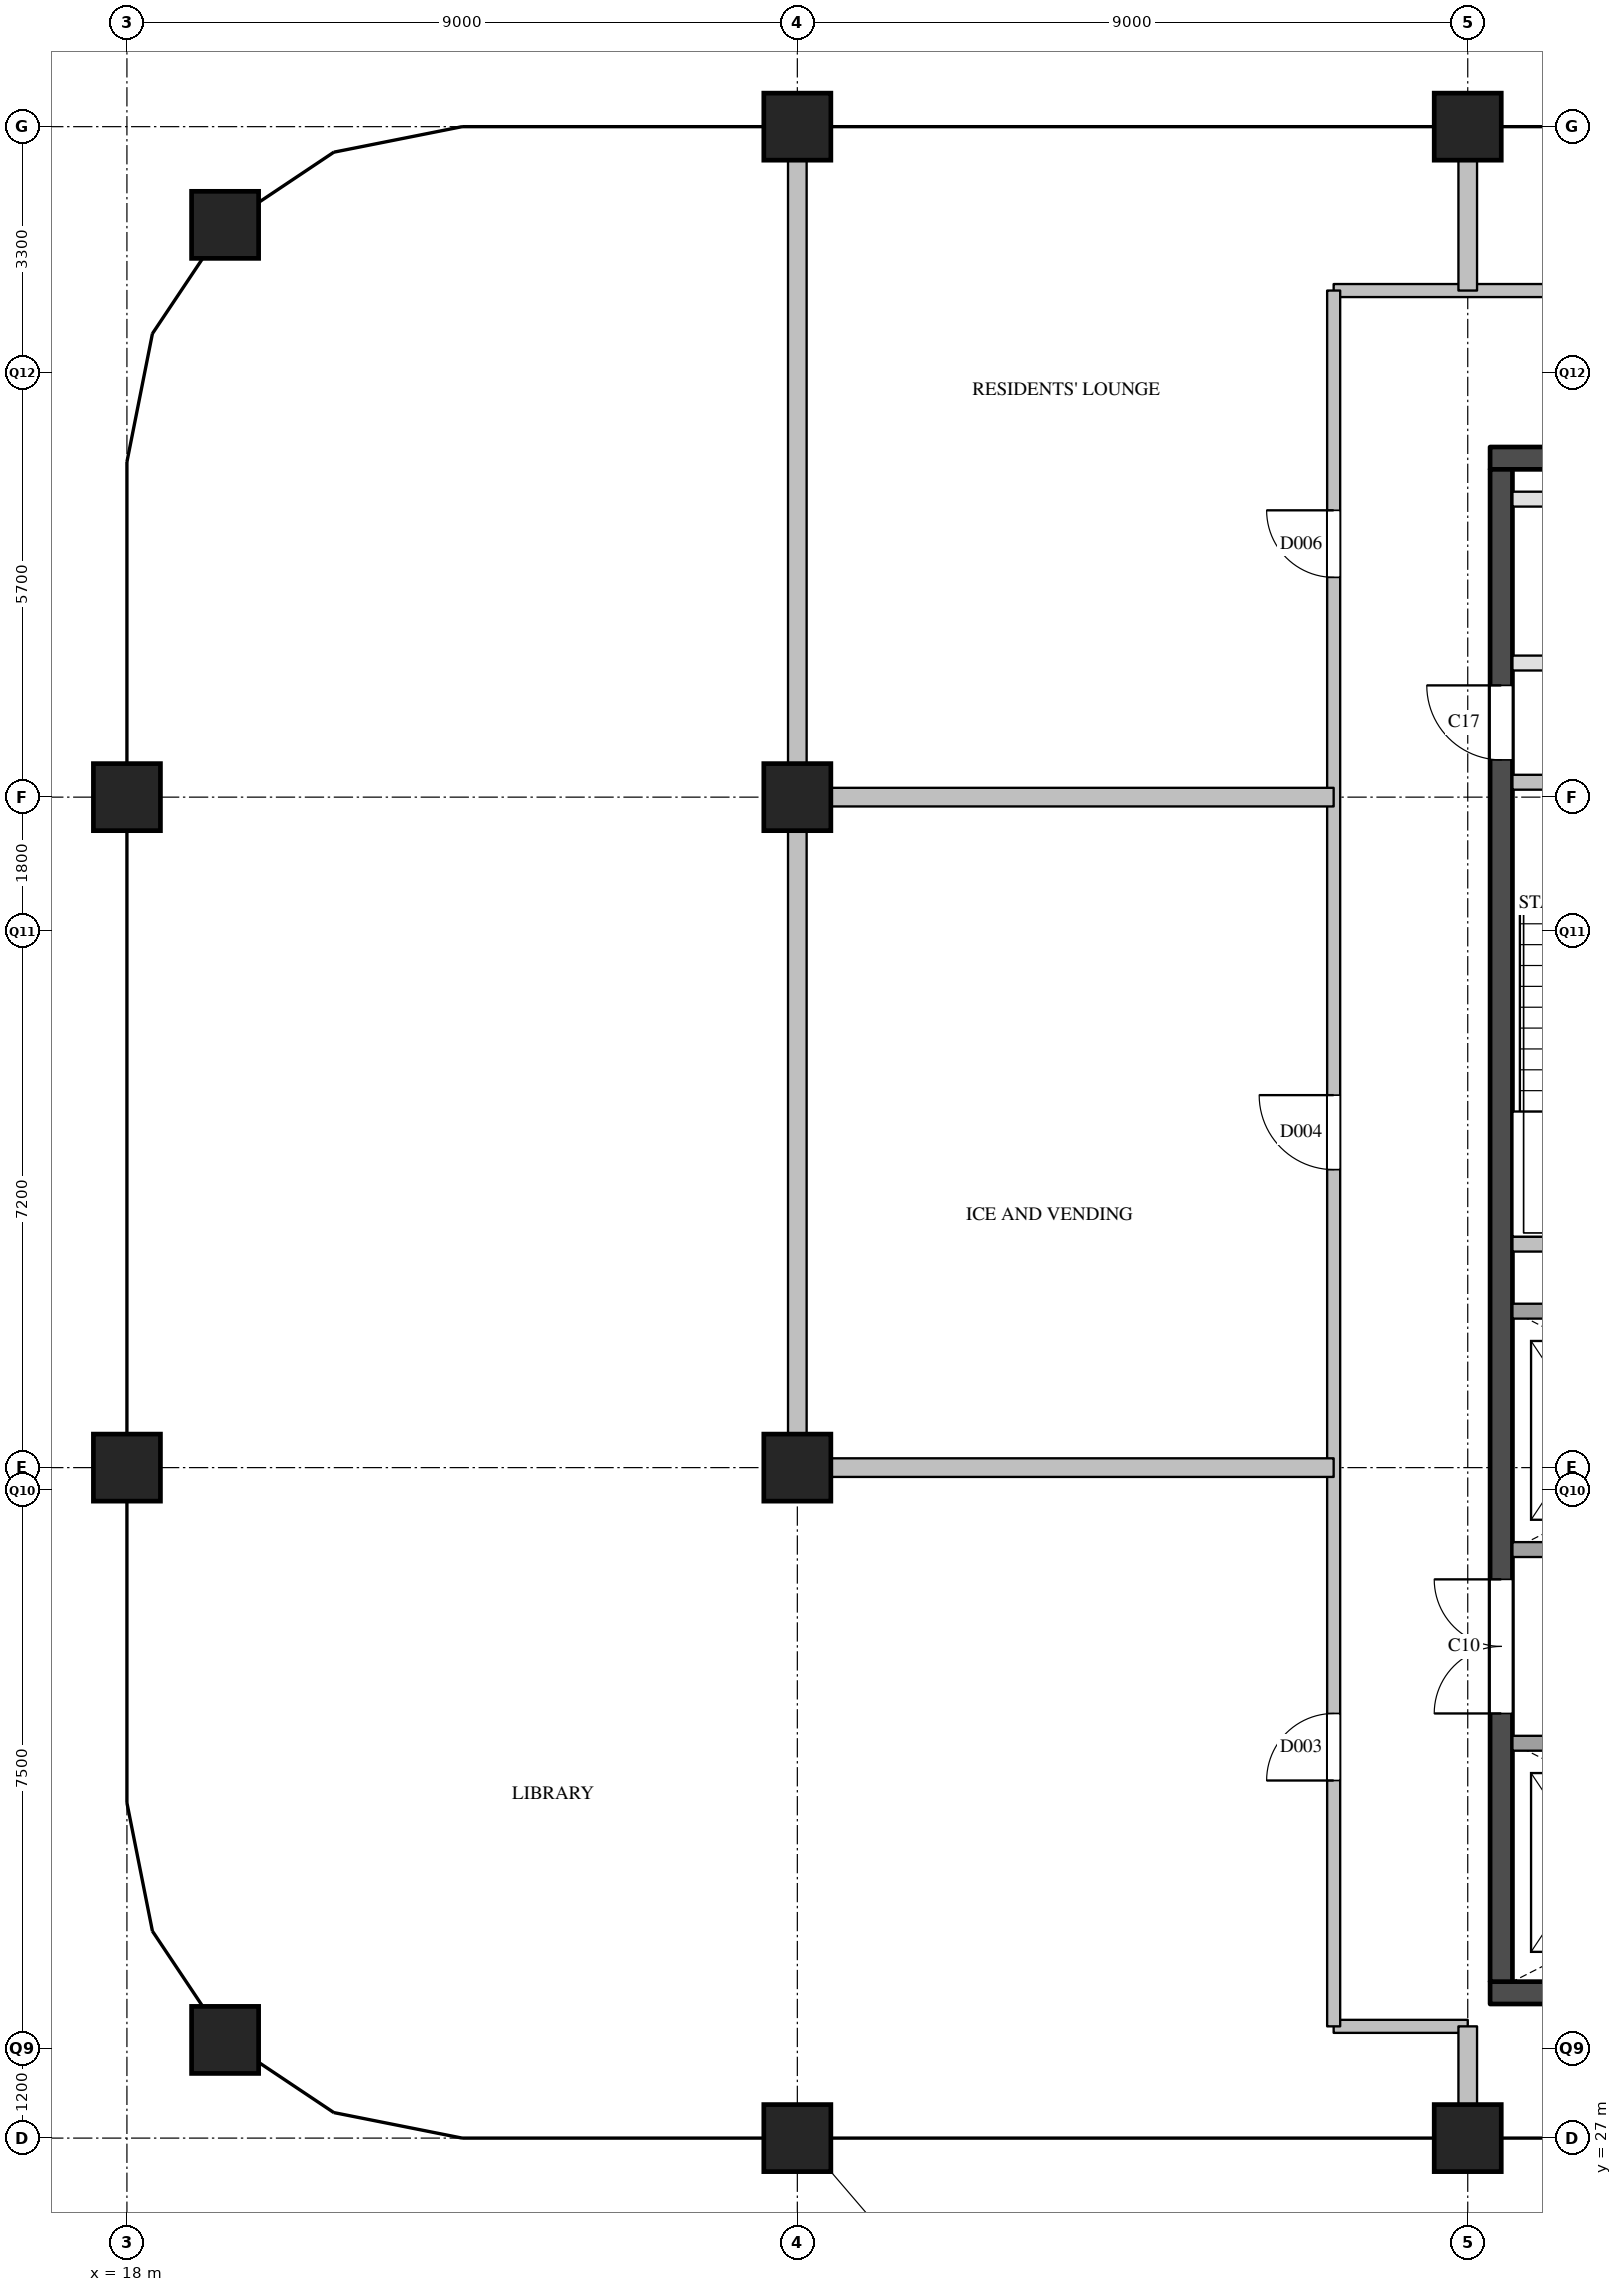
"""IFC4 building model, lengths in metres.
Left out: names, types, materials, properties, quantities, classifications, styles, units other than length and angle.
Written with IfcOpenShell. Run it as: python <this file> out.ifc"""

import sys

from ifc_helpers import new_model, si_unit, direction, frame, frame_2d, origin, origin_2d, place, context, subcontext, project, spatial, rectangle, extrude, element, fill, save


model = new_model("IFC4")
c1 = context("Model", 3, precision=1e-05, world=origin(), true_north=direction((0.0, 1.0)))
c2 = subcontext(c1, "Body", "Model", "MODEL_VIEW")
j1 = project(units=[si_unit("LENGTHUNIT", "METRE"), si_unit("PLANEANGLEUNIT", "RADIAN")], contexts=[c1])
p1 = place(None, origin())
s1 = spatial("IfcSite", under=j1, at=p1, CompositionType="ELEMENT")
p2 = place(p1, origin())
s2 = spatial("IfcBuilding", under=s1, at=p2, CompositionType="ELEMENT")
p3 = place(p2, frame((0.0, 0.0, 316.8)))
s3 = spatial("IfcBuildingStorey", under=s2, at=p3, CompositionType="ELEMENT", Elevation=316.8)
for number, where, z_axis, x_axis in (
    (1, (19.318, 28.318, 0.0), (0.0, 0.0, 1.0), (1.0, 0.0, 0.0)),
    (2, (18.0, 36.0, 0.0), (0.0, 0.0, 1.0), (1.0, 0.0, 0.0)),
    (3, (18.0, 45.0, 0.0), (0.0, 0.0, 1.0), (1.0, 0.0, 0.0)),
    (4, (19.318, 52.682, 0.0), (0.0, 0.0, 1.0), (1.0, 0.0, 0.0)),
    (5, (27.0, 27.0, 0.0), (0.0, 0.0, 1.0), (1.0, 0.0, 0.0)),
    (6, (27.0, 36.0, 0.0), (0.0, 0.0, 1.0), (1.0, 0.0, 0.0)),
    (7, (27.0, 45.0, 0.0), (0.0, 0.0, 1.0), (1.0, 0.0, 0.0)),
    (8, (27.0, 54.0, 0.0), (0.0, 0.0, 1.0), (1.0, 0.0, 0.0)),
    (9, (36.0, 27.0, 0.0), (0.0, 0.0, 1.0), (1.0, 0.0, 0.0)),
    (10, (36.0, 54.0, 0.0), (0.0, 0.0, 1.0), (1.0, 0.0, 0.0)),
):
    element("IfcColumn", number, at=place(p3, frame(where, z_axis=z_axis, x_axis=x_axis)), inside=s3, PredefinedType="COLUMN", context=c2, shape_type="SweptSolid", body=[
        extrude(rectangle(XDim=0.9, YDim=0.9, at=origin_2d()), origin(), (0.0, 0.0, 1.0), 3.9),
    ])
p4 = place(p3, frame((36.3, 28.95, 0.0), z_axis=(0.0, 0.0, 1.0), x_axis=(1.0, 0.0, 0.0)))
e11 = element("IfcWall", 11, at=p4, inside=s3, PredefinedType="SHEAR", context=c2, shape_type="SweptSolid", body=[
    extrude(rectangle(XDim=11.8, YDim=0.3, at=frame_2d((5.9, 0.0))), origin(), (0.0, 0.0, 1.0), 3.6),
])
p5 = place(p4, frame((0.75, 0.0, 0.0)))
e12 = element("IfcOpeningElement", 12, at=p5, cuts=e11, PredefinedType="OPENING", context=c2, shape_type="SweptSolid", body=[
    extrude(rectangle(XDim=1.2, YDim=2.1, at=frame_2d((0.6, 1.05))), frame((0.0, 0.16, 0.0), z_axis=(0.0, -1.0, 0.0), x_axis=(1.0, 0.0, 0.0)), (0.0, 0.0, 1.0), 0.32),
])
p6 = place(p4, frame((2.85, 0.0, 0.0)))
e13 = element("IfcOpeningElement", 13, at=p6, cuts=e11, PredefinedType="OPENING", context=c2, shape_type="SweptSolid", body=[
    extrude(rectangle(XDim=1.2, YDim=2.1, at=frame_2d((0.6, 1.05))), frame((0.0, 0.16, 0.0), z_axis=(0.0, -1.0, 0.0), x_axis=(1.0, 0.0, 0.0)), (0.0, 0.0, 1.0), 0.32),
])
p7 = place(p4, frame((4.95, 0.0, 0.0)))
e14 = element("IfcOpeningElement", 14, at=p7, cuts=e11, PredefinedType="OPENING", context=c2, shape_type="SweptSolid", body=[
    extrude(rectangle(XDim=1.2, YDim=2.1, at=frame_2d((0.6, 1.05))), frame((0.0, 0.16, 0.0), z_axis=(0.0, -1.0, 0.0), x_axis=(1.0, 0.0, 0.0)), (0.0, 0.0, 1.0), 0.32),
])
p8 = place(p3, frame((36.3, 49.55, 0.0), z_axis=(0.0, 0.0, 1.0), x_axis=(1.0, 0.0, 0.0)))
e15 = element("IfcWall", 15, at=p8, inside=s3, PredefinedType="SHEAR", context=c2, shape_type="SweptSolid", body=[
    extrude(rectangle(XDim=11.8, YDim=0.3, at=frame_2d((5.9, 0.0))), origin(), (0.0, 0.0, 1.0), 3.6),
])
p9 = place(p3, frame((36.45, 29.1, 0.0), z_axis=(0.0, 0.0, 1.0), x_axis=(0.0, 1.0, 0.0)))
e16 = element("IfcWall", 16, at=p9, inside=s3, PredefinedType="SHEAR", context=c2, shape_type="SweptSolid", body=[
    extrude(rectangle(XDim=20.3, YDim=0.3, at=frame_2d((10.15, 0.0))), origin(), (0.0, 0.0, 1.0), 3.6),
])
p10 = place(p9, frame((3.6, 0.0, 0.0)))
e17 = element("IfcOpeningElement", 17, at=p10, cuts=e16, PredefinedType="OPENING", context=c2, shape_type="SweptSolid", body=[
    extrude(rectangle(XDim=1.8, YDim=2.1, at=frame_2d((0.9, 1.05))), frame((0.0, 0.16, 0.0), z_axis=(0.0, -1.0, 0.0), x_axis=(1.0, 0.0, 0.0)), (0.0, 0.0, 1.0), 0.32),
])
p11 = place(p9, frame((16.4, 0.0, 0.0)))
e18 = element("IfcOpeningElement", 18, at=p11, cuts=e16, PredefinedType="OPENING", context=c2, shape_type="SweptSolid", body=[
    extrude(rectangle(XDim=1.0, YDim=2.1, at=frame_2d((0.5, 1.05))), frame((0.0, 0.16, 0.0), z_axis=(0.0, -1.0, 0.0), x_axis=(1.0, 0.0, 0.0)), (0.0, 0.0, 1.0), 0.32),
])
p12 = place(p3, frame((36.6, 32.3, 0.0), z_axis=(0.0, 0.0, 1.0), x_axis=(1.0, 0.0, 0.0)))
e19 = element("IfcWall", 19, at=p12, inside=s3, PredefinedType="SOLIDWALL", context=c2, shape_type="SweptSolid", body=[
    extrude(rectangle(XDim=11.2, YDim=0.2, at=frame_2d((5.6, 0.0))), origin(), (0.0, 0.0, 1.0), 3.6),
])
p13 = place(p12, frame((7.225, 0.0, 0.0)))
e20 = element("IfcOpeningElement", 20, at=p13, cuts=e19, PredefinedType="OPENING", context=c2, shape_type="SweptSolid", body=[
    extrude(rectangle(XDim=1.2, YDim=2.1, at=frame_2d((0.6, 1.05))), frame((0.0, 0.11, 0.0), z_axis=(0.0, -1.0, 0.0), x_axis=(1.0, 0.0, 0.0)), (0.0, 0.0, 1.0), 0.22),
])
p14 = place(p12, frame((9.475, 0.0, 0.0)))
e21 = element("IfcOpeningElement", 21, at=p14, cuts=e19, PredefinedType="OPENING", context=c2, shape_type="SweptSolid", body=[
    extrude(rectangle(XDim=1.2, YDim=2.1, at=frame_2d((0.6, 1.05))), frame((0.0, 0.11, 0.0), z_axis=(0.0, -1.0, 0.0), x_axis=(1.0, 0.0, 0.0)), (0.0, 0.0, 1.0), 0.22),
])
p15 = place(p3, frame((36.6, 34.9, 0.0), z_axis=(0.0, 0.0, 1.0), x_axis=(1.0, 0.0, 0.0)))
e22 = element("IfcWall", 22, at=p15, inside=s3, PredefinedType="SOLIDWALL", context=c2, shape_type="SweptSolid", body=[
    extrude(rectangle(XDim=6.3, YDim=0.2, at=frame_2d((3.15, 0.0))), origin(), (0.0, 0.0, 1.0), 3.6),
])
p16 = place(p3, frame((36.6, 38.1, 0.0), z_axis=(0.0, 0.0, 1.0), x_axis=(1.0, 0.0, 0.0)))
e23 = element("IfcWall", 23, at=p16, inside=s3, PredefinedType="SOLIDWALL", context=c2, shape_type="SweptSolid", body=[
    extrude(rectangle(XDim=6.7, YDim=0.2, at=frame_2d((3.35, 0.0))), origin(), (0.0, 0.0, 1.0), 3.6),
])
p17 = place(p16, frame((0.45, 0.0, 0.0)))
e24 = element("IfcOpeningElement", 24, at=p17, cuts=e23, PredefinedType="OPENING", context=c2, shape_type="SweptSolid", body=[
    extrude(rectangle(XDim=1.2, YDim=2.1, at=frame_2d((0.6, 1.05))), frame((0.0, 0.11, 0.0), z_axis=(0.0, -1.0, 0.0), x_axis=(1.0, 0.0, 0.0)), (0.0, 0.0, 1.0), 0.22),
])
p18 = place(p16, frame((2.55, 0.0, 0.0)))
e25 = element("IfcOpeningElement", 25, at=p18, cuts=e23, PredefinedType="OPENING", context=c2, shape_type="SweptSolid", body=[
    extrude(rectangle(XDim=1.2, YDim=2.1, at=frame_2d((0.6, 1.05))), frame((0.0, 0.11, 0.0), z_axis=(0.0, -1.0, 0.0), x_axis=(1.0, 0.0, 0.0)), (0.0, 0.0, 1.0), 0.22),
])
p19 = place(p16, frame((4.65, 0.0, 0.0)))
e26 = element("IfcOpeningElement", 26, at=p19, cuts=e23, PredefinedType="OPENING", context=c2, shape_type="SweptSolid", body=[
    extrude(rectangle(XDim=1.2, YDim=2.1, at=frame_2d((0.6, 1.05))), frame((0.0, 0.11, 0.0), z_axis=(0.0, -1.0, 0.0), x_axis=(1.0, 0.0, 0.0)), (0.0, 0.0, 1.0), 0.22),
])
p20 = place(p3, frame((36.6, 39.0, 0.0), z_axis=(0.0, 0.0, 1.0), x_axis=(1.0, 0.0, 0.0)))
e27 = element("IfcWall", 27, at=p20, inside=s3, PredefinedType="SOLIDWALL", context=c2, shape_type="SweptSolid", body=[
    extrude(rectangle(XDim=3.25, YDim=0.2, at=frame_2d((1.625, 0.0))), origin(), (0.0, 0.0, 1.0), 3.6),
])
p21 = place(p3, frame((36.6, 45.2, 0.0), z_axis=(0.0, 0.0, 1.0), x_axis=(1.0, 0.0, 0.0)))
e28 = element("IfcWall", 28, at=p21, inside=s3, PredefinedType="SOLIDWALL", context=c2, shape_type="SweptSolid", body=[
    extrude(rectangle(XDim=10.05, YDim=0.2, at=frame_2d((5.025, 0.0))), origin(), (0.0, 0.0, 1.0), 3.6),
])
p22 = place(p21, frame((1.125, 0.0, 0.0)))
e29 = element("IfcOpeningElement", 29, at=p22, cuts=e28, PredefinedType="OPENING", context=c2, shape_type="SweptSolid", body=[
    extrude(rectangle(XDim=1.1, YDim=2.1, at=frame_2d((0.55, 1.05))), frame((0.0, 0.11, 0.0), z_axis=(0.0, -1.0, 0.0), x_axis=(1.0, 0.0, 0.0)), (0.0, 0.0, 1.0), 0.22),
])
p23 = place(p21, frame((4.475, 0.0, 0.0)))
e30 = element("IfcOpeningElement", 30, at=p23, cuts=e28, PredefinedType="OPENING", context=c2, shape_type="SweptSolid", body=[
    extrude(rectangle(XDim=1.1, YDim=2.1, at=frame_2d((0.55, 1.05))), frame((0.0, 0.11, 0.0), z_axis=(0.0, -1.0, 0.0), x_axis=(1.0, 0.0, 0.0)), (0.0, 0.0, 1.0), 0.22),
])
p24 = place(p21, frame((7.825, 0.0, 0.0)))
e31 = element("IfcOpeningElement", 31, at=p24, cuts=e28, PredefinedType="OPENING", context=c2, shape_type="SweptSolid", body=[
    extrude(rectangle(XDim=1.1, YDim=2.1, at=frame_2d((0.55, 1.05))), frame((0.0, 0.11, 0.0), z_axis=(0.0, -1.0, 0.0), x_axis=(1.0, 0.0, 0.0)), (0.0, 0.0, 1.0), 0.22),
])
p25 = place(p3, frame((36.6, 46.8, 0.0), z_axis=(0.0, 0.0, 1.0), x_axis=(1.0, 0.0, 0.0)))
e32 = element("IfcWall", 32, at=p25, inside=s3, PredefinedType="PARTITIONING", context=c2, shape_type="SweptSolid", body=[
    extrude(rectangle(XDim=11.2, YDim=0.2, at=frame_2d((5.6, 0.0))), origin(), (0.0, 0.0, 1.0), 3.6),
])
p26 = place(p25, frame((3.75, 0.0, 0.0)))
e33 = element("IfcOpeningElement", 33, at=p26, cuts=e32, PredefinedType="OPENING", context=c2, shape_type="SweptSolid", body=[
    extrude(rectangle(XDim=0.9, YDim=2.1, at=frame_2d((0.45, 1.05))), frame((0.0, 0.11, 0.0), z_axis=(0.0, -1.0, 0.0), x_axis=(1.0, 0.0, 0.0)), (0.0, 0.0, 1.0), 0.22),
])
p27 = place(p25, frame((9.35, 0.0, 0.0)))
e34 = element("IfcOpeningElement", 34, at=p27, cuts=e32, PredefinedType="OPENING", context=c2, shape_type="SweptSolid", body=[
    extrude(rectangle(XDim=0.9, YDim=2.1, at=frame_2d((0.45, 1.05))), frame((0.0, 0.11, 0.0), z_axis=(0.0, -1.0, 0.0), x_axis=(1.0, 0.0, 0.0)), (0.0, 0.0, 1.0), 0.22),
])
p28 = place(p3, frame((36.6, 49.0, 0.0), z_axis=(0.0, 0.0, 1.0), x_axis=(1.0, 0.0, 0.0)))
e35 = element("IfcWall", 35, at=p28, inside=s3, PredefinedType="PARTITIONING", context=c2, shape_type="SweptSolid", body=[
    extrude(rectangle(XDim=11.2, YDim=0.2, at=frame_2d((5.6, 0.0))), origin(), (0.0, 0.0, 1.0), 3.6),
])
p29 = place(p3, frame((34.2, 28.5, 0.0), z_axis=(0.0, 0.0, 1.0), x_axis=(1.0, 0.0, 0.0)))
e36 = element("IfcWall", 36, at=p29, inside=s3, PredefinedType="PARTITIONING", context=c2, shape_type="SweptSolid", body=[
    extrude(rectangle(XDim=1.8, YDim=0.175, at=frame_2d((0.9, 0.0))), origin(), (0.0, 0.0, 1.0), 3.6),
])
p30 = place(p3, frame((34.2, 51.8, 0.0), z_axis=(0.0, 0.0, 1.0), x_axis=(1.0, 0.0, 0.0)))
e37 = element("IfcWall", 37, at=p30, inside=s3, PredefinedType="PARTITIONING", context=c2, shape_type="SweptSolid", body=[
    extrude(rectangle(XDim=16.0, YDim=0.175, at=frame_2d((8.0, 0.0))), origin(), (0.0, 0.0, 1.0), 3.6),
])
p31 = place(p30, frame((5.85, 0.0, 0.0)))
e38 = element("IfcOpeningElement", 38, at=p31, cuts=e37, PredefinedType="OPENING", context=c2, shape_type="SweptSolid", body=[
    extrude(rectangle(XDim=0.9, YDim=2.1, at=frame_2d((0.45, 1.05))), frame((0.0, 0.097, 0.0), z_axis=(0.0, -1.0, 0.0), x_axis=(1.0, 0.0, 0.0)), (0.0, 0.0, 1.0), 0.195),
])
p32 = place(p3, frame((34.2, 28.5, 0.0), z_axis=(0.0, 0.0, 1.0), x_axis=(0.0, 1.0, 0.0)))
e39 = element("IfcWall", 39, at=p32, inside=s3, PredefinedType="PARTITIONING", context=c2, shape_type="SweptSolid", body=[
    extrude(rectangle(XDim=23.3, YDim=0.175, at=frame_2d((11.65, 0.0))), origin(), (0.0, 0.0, 1.0), 3.6),
])
p33 = place(p32, frame((3.3, 0.0, 0.0)))
e40 = element("IfcOpeningElement", 40, at=p33, cuts=e39, PredefinedType="OPENING", context=c2, shape_type="SweptSolid", body=[
    extrude(rectangle(XDim=0.9, YDim=2.1, at=frame_2d((0.45, 1.05))), frame((0.0, 0.097, 0.0), z_axis=(0.0, -1.0, 0.0), x_axis=(1.0, 0.0, 0.0)), (0.0, 0.0, 1.0), 0.195),
])
p34 = place(p32, frame((11.5, 0.0, 0.0)))
e41 = element("IfcOpeningElement", 41, at=p34, cuts=e39, PredefinedType="OPENING", context=c2, shape_type="SweptSolid", body=[
    extrude(rectangle(XDim=1.0, YDim=2.1, at=frame_2d((0.5, 1.05))), frame((0.0, 0.097, 0.0), z_axis=(0.0, -1.0, 0.0), x_axis=(1.0, 0.0, 0.0)), (0.0, 0.0, 1.0), 0.195),
])
p35 = place(p32, frame((19.45, 0.0, 0.0)))
e42 = element("IfcOpeningElement", 42, at=p35, cuts=e39, PredefinedType="OPENING", context=c2, shape_type="SweptSolid", body=[
    extrude(rectangle(XDim=0.9, YDim=2.1, at=frame_2d((0.45, 1.05))), frame((0.0, 0.097, 0.0), z_axis=(0.0, -1.0, 0.0), x_axis=(1.0, 0.0, 0.0)), (0.0, 0.0, 1.0), 0.195),
])
p36 = place(p3, frame((27.125, 36.0, 0.0), z_axis=(0.0, 0.0, 1.0), x_axis=(1.0, 0.0, 0.0)))
e43 = element("IfcWall", 43, at=p36, inside=s3, PredefinedType="PARTITIONING", context=c2, shape_type="SweptSolid", body=[
    extrude(rectangle(XDim=7.075, YDim=0.25, at=frame_2d((3.538, 0.0))), origin(), (0.0, 0.0, 1.0), 3.6),
])
p37 = place(p3, frame((27.0, 45.0, 0.0), z_axis=(0.0, 0.0, 1.0), x_axis=(1.0, 0.0, 0.0)))
e44 = element("IfcWall", 44, at=p37, inside=s3, PredefinedType="PARTITIONING", context=c2, shape_type="SweptSolid", body=[
    extrude(rectangle(XDim=7.2, YDim=0.25, at=frame_2d((3.6, 0.0))), origin(), (0.0, 0.0, 1.0), 3.6),
])
p38 = place(p3, frame((27.0, 35.875, 0.0), z_axis=(0.0, 0.0, 1.0), x_axis=(0.0, 1.0, 0.0)))
e45 = element("IfcWall", 45, at=p38, inside=s3, PredefinedType="PARTITIONING", context=c2, shape_type="SweptSolid", body=[
    extrude(rectangle(XDim=18.125, YDim=0.25, at=frame_2d((9.062, 0.0))), origin(), (0.0, 0.0, 1.0), 2.35),
])
p39 = place(p3, frame((36.0, 27.0, 0.0), z_axis=(0.0, 0.0, 1.0), x_axis=(0.0, 1.0, 0.0)))
e46 = element("IfcWall", 46, at=p39, inside=s3, PredefinedType="PARTITIONING", context=c2, shape_type="SweptSolid", body=[
    extrude(rectangle(XDim=1.5, YDim=0.25, at=frame_2d((0.75, 0.0))), origin(), (0.0, 0.0, 1.0), 3.6),
])
p40 = place(p3, frame((36.0, 51.8, 0.0), z_axis=(0.0, 0.0, 1.0), x_axis=(0.0, 1.0, 0.0)))
e47 = element("IfcWall", 47, at=p40, inside=s3, PredefinedType="PARTITIONING", context=c2, shape_type="SweptSolid", body=[
    extrude(rectangle(XDim=2.2, YDim=0.25, at=frame_2d((1.1, 0.0))), origin(), (0.0, 0.0, 1.0), 3.6),
])
p41 = place(p10, origin())
e48 = element("IfcDoor", 48, at=p41, inside=s3, OperationType="DOUBLE_DOOR_SINGLE_SWING", PredefinedType="DOOR", context=c2, shape_type="SweptSolid", body=[
    extrude(rectangle(XDim=1.8, YDim=2.1, at=frame_2d((0.9, 1.05))), frame((0.0, 0.025, 0.0), z_axis=(0.0, -1.0, 0.0), x_axis=(1.0, 0.0, 0.0)), (0.0, 0.0, 1.0), 0.05),
])
fill(e17, e48)
p42 = place(p11, origin())
e49 = element("IfcDoor", 49, at=p42, inside=s3, OperationType="SINGLE_SWING_RIGHT", PredefinedType="DOOR", context=c2, shape_type="SweptSolid", body=[
    extrude(rectangle(XDim=1.0, YDim=2.1, at=frame_2d((0.5, 1.05))), frame((0.0, 0.025, 0.0), z_axis=(0.0, -1.0, 0.0), x_axis=(1.0, 0.0, 0.0)), (0.0, 0.0, 1.0), 0.05),
])
fill(e18, e49)
p43 = place(p33, origin())
e50 = element("IfcDoor", 50, at=p43, inside=s3, OperationType="SINGLE_SWING_LEFT", PredefinedType="DOOR", context=c2, shape_type="SweptSolid", body=[
    extrude(rectangle(XDim=0.9, YDim=2.1, at=frame_2d((0.45, 1.05))), frame((0.0, 0.025, 0.0), z_axis=(0.0, -1.0, 0.0), x_axis=(1.0, 0.0, 0.0)), (0.0, 0.0, 1.0), 0.05),
])
fill(e40, e50)
p44 = place(p34, origin())
e51 = element("IfcDoor", 51, at=p44, inside=s3, OperationType="SINGLE_SWING_RIGHT", PredefinedType="DOOR", context=c2, shape_type="SweptSolid", body=[
    extrude(rectangle(XDim=1.0, YDim=2.1, at=frame_2d((0.5, 1.05))), frame((0.0, 0.025, 0.0), z_axis=(0.0, -1.0, 0.0), x_axis=(1.0, 0.0, 0.0)), (0.0, 0.0, 1.0), 0.05),
])
fill(e41, e51)
p45 = place(p35, origin())
e52 = element("IfcDoor", 52, at=p45, inside=s3, OperationType="SINGLE_SWING_RIGHT", PredefinedType="DOOR", context=c2, shape_type="SweptSolid", body=[
    extrude(rectangle(XDim=0.9, YDim=2.1, at=frame_2d((0.45, 1.05))), frame((0.0, 0.025, 0.0), z_axis=(0.0, -1.0, 0.0), x_axis=(1.0, 0.0, 0.0)), (0.0, 0.0, 1.0), 0.05),
])
fill(e42, e52)
save(model, sys.argv[1])
